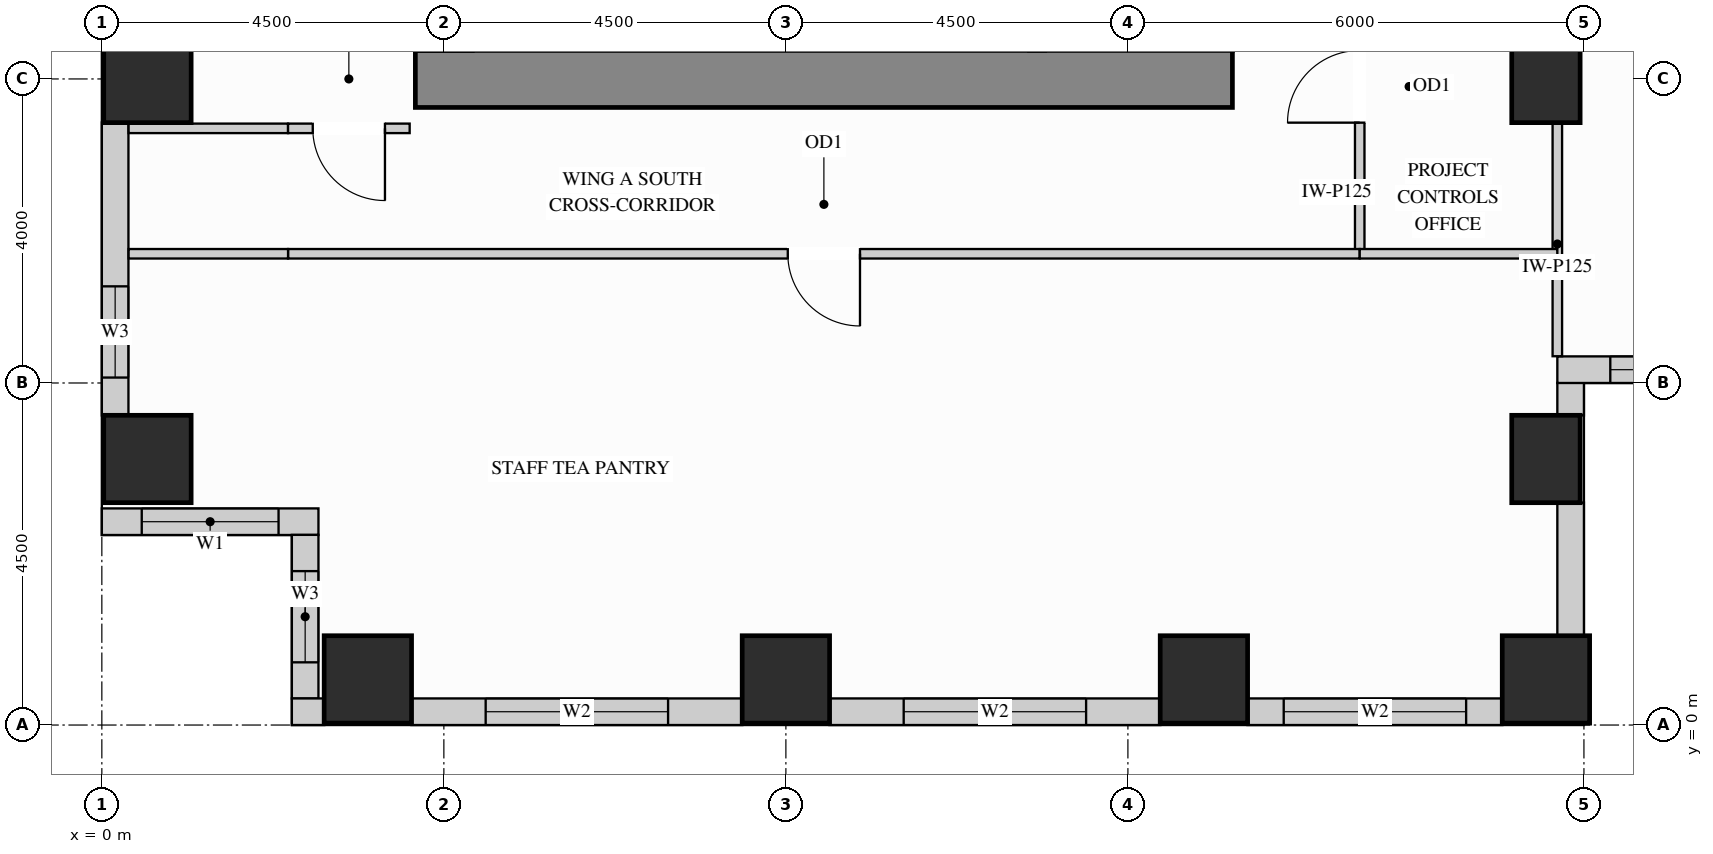
"""IFC4 building model, lengths in metres.
Left out: names, types, materials, properties, quantities, classifications, styles, units other than length and angle.
Written with IfcOpenShell. Run it as: python <this file> out.ifc"""

import sys

from ifc_helpers import new_model, si_unit, direction, frame, frame_2d, origin, origin_2d, place, context, subcontext, project, spatial, rectangle, extrude, source, transform, mapped, element, fill, save


model = new_model("IFC4")
c1 = context("Model", 3, precision=1e-05, world=origin(), true_north=direction((0.0, 1.0)))
c2 = subcontext(c1, "Body", "Model", "MODEL_VIEW")
j1 = project(units=[si_unit("LENGTHUNIT", "METRE"), si_unit("PLANEANGLEUNIT", "RADIAN")], contexts=[c1])
p1 = place(None, origin())
s1 = spatial("IfcSite", under=j1, at=p1, CompositionType="ELEMENT")
p2 = place(p1, origin())
s2 = spatial("IfcBuilding", under=s1, at=p2, CompositionType="ELEMENT")
p3 = place(p2, frame((0.0, 0.0, 84.6)))
s3 = spatial("IfcBuildingStorey", under=s2, at=p3, CompositionType="ELEMENT", Elevation=84.6)
m1 = source(origin(), c2, "Body", "SweptSolid", [
    extrude(rectangle(XDim=0.9, YDim=1.15, at=origin_2d()), origin(), (0.0, 0.0, 1.0), 3.38),
])
for number, where, z_axis, x_axis in (
    (1, (19.0, 3.5, 0.0), (0.0, 0.0, 1.0), (1.0, 0.0, 0.0)),
    (2, (19.0, 8.5, 0.0), (0.0, 0.0, 1.0), (1.0, 0.0, 0.0)),
):
    element("IfcColumn", number, at=place(p3, frame(where, z_axis=z_axis, x_axis=x_axis)), inside=s3, PredefinedType="COLUMN", context=c2, shape_type="MappedRepresentation", body=[
        mapped(m1, transform((0.0, 0.0, 0.0), x_axis=(1.0, 0.0, 0.0), y_axis=(0.0, 1.0, 0.0), z_axis=(0.0, 0.0, 1.0))),
    ])
m2 = source(origin(), c2, "Body", "SweptSolid", [
    extrude(rectangle(XDim=1.15, YDim=1.15, at=origin_2d()), origin(), (0.0, 0.0, 1.0), 3.38),
])
for number, where, z_axis, x_axis in (
    (3, (14.5, 0.6, 0.0), (0.0, 0.0, 1.0), (1.0, 0.0, 0.0)),
    (4, (19.0, 0.6, 0.0), (0.0, 0.0, 1.0), (1.0, 0.0, 0.0)),
    (5, (3.5, 0.6, 0.0), (0.0, 0.0, 1.0), (1.0, 0.0, 0.0)),
    (6, (9.0, 0.6, 0.0), (0.0, 0.0, 1.0), (1.0, 0.0, 0.0)),
    (7, (0.6, 3.5, 0.0), (0.0, 0.0, 1.0), (1.0, 0.0, 0.0)),
    (8, (0.6, 8.5, 0.0), (0.0, 0.0, 1.0), (1.0, 0.0, 0.0)),
):
    element("IfcColumn", number, at=place(p3, frame(where, z_axis=z_axis, x_axis=x_axis)), inside=s3, PredefinedType="COLUMN", context=c2, shape_type="MappedRepresentation", body=[
        mapped(m2, transform((0.0, 0.0, 0.0), x_axis=(1.0, 0.0, 0.0), y_axis=(0.0, 1.0, 0.0), z_axis=(0.0, 0.0, 1.0))),
    ])
m3 = source(origin(), c2, "Body", "SweptSolid", [
    extrude(rectangle(XDim=10.75, YDim=0.75, at=frame_2d((5.375, 0.0))), origin(), (0.0, 0.0, 1.0), 3.38),
])
p4 = place(p3, frame((4.125, 8.5, 0.0), z_axis=(0.0, 0.0, 1.0), x_axis=(1.0, 0.0, 0.0)))
e9 = element("IfcWall", 9, at=p4, inside=s3, PredefinedType="SHEAR", context=c2, shape_type="MappedRepresentation", body=[
    mapped(m3, transform((0.0, 0.0, 0.0), x_axis=(1.0, 0.0, 0.0), y_axis=(0.0, 1.0, 0.0), z_axis=(0.0, 0.0, 1.0))),
])
p5 = place(p3, frame((0.175, 7.927, 0.0), z_axis=(0.0, 0.0, 1.0), x_axis=(0.0, -1.0, 0.0)))
e10 = element("IfcWall", 10, at=p5, inside=s3, PredefinedType="SOLIDWALL", context=c2, shape_type="SweptSolid", body=[
    extrude(rectangle(XDim=3.854, YDim=0.35, at=frame_2d((1.927, 0.0))), origin(), (0.0, 0.0, 1.0), 3.365),
])
p6 = place(p5, frame((2.156, 0.0, 0.78)))
e11 = element("IfcOpeningElement", 11, at=p6, cuts=e10, PredefinedType="OPENING", context=c2, shape_type="SweptSolid", body=[
    extrude(rectangle(XDim=1.2, YDim=2.1, at=frame_2d((0.6, 1.05))), frame((0.0, 0.185, 0.0), z_axis=(0.0, -1.0, 0.0), x_axis=(1.0, 0.0, 0.0)), (0.0, 0.0, 1.0), 0.37),
])
p7 = place(p3, frame((0.0, 2.675, 0.0), z_axis=(0.0, 0.0, 1.0), x_axis=(1.0, 0.0, 0.0)))
e12 = element("IfcWall", 12, at=p7, inside=s3, PredefinedType="SOLIDWALL", context=c2, shape_type="SweptSolid", body=[
    extrude(rectangle(XDim=2.85, YDim=0.35, at=frame_2d((1.425, 0.0))), origin(), (0.0, 0.0, 1.0), 3.365),
])
p8 = place(p7, frame((0.525, 0.0, 0.78)))
e13 = element("IfcOpeningElement", 13, at=p8, cuts=e12, PredefinedType="OPENING", context=c2, shape_type="SweptSolid", body=[
    extrude(rectangle(XDim=1.8, YDim=2.1, at=frame_2d((0.9, 1.05))), frame((0.0, 0.185, 0.0), z_axis=(0.0, -1.0, 0.0), x_axis=(1.0, 0.0, 0.0)), (0.0, 0.0, 1.0), 0.37),
])
p9 = place(p3, frame((2.675, 2.502, 0.0), z_axis=(0.0, 0.0, 1.0), x_axis=(0.0, -1.0, 0.0)))
e14 = element("IfcWall", 14, at=p9, inside=s3, PredefinedType="SOLIDWALL", context=c2, shape_type="SweptSolid", body=[
    extrude(rectangle(XDim=2.154, YDim=0.35, at=frame_2d((1.077, 0.0))), origin(), (0.0, 0.0, 1.0), 3.365),
])
p10 = place(p9, frame((0.477, 0.0, 0.78)))
e15 = element("IfcOpeningElement", 15, at=p10, cuts=e14, PredefinedType="OPENING", context=c2, shape_type="SweptSolid", body=[
    extrude(rectangle(XDim=1.2, YDim=2.1, at=frame_2d((0.6, 1.05))), frame((0.0, 0.185, 0.0), z_axis=(0.0, -1.0, 0.0), x_axis=(1.0, 0.0, 0.0)), (0.0, 0.0, 1.0), 0.37),
])
m4 = source(origin(), c2, "Body", "SweptSolid", [
    extrude(rectangle(XDim=0.427, YDim=0.35, at=frame_2d((0.213, 0.0))), origin(), (0.0, 0.0, 1.0), 3.365),
])
p11 = place(p3, frame((2.5, 0.175, 0.0), z_axis=(0.0, 0.0, 1.0), x_axis=(1.0, 0.0, 0.0)))
e16 = element("IfcWall", 16, at=p11, inside=s3, PredefinedType="SOLIDWALL", context=c2, shape_type="MappedRepresentation", body=[
    mapped(m4, transform((0.0, 0.0, 0.0), x_axis=(1.0, 0.0, 0.0), y_axis=(0.0, 1.0, 0.0), z_axis=(0.0, 0.0, 1.0))),
])
p12 = place(p3, frame((4.073, 0.175, 0.0), z_axis=(0.0, 0.0, 1.0), x_axis=(1.0, 0.0, 0.0)))
e17 = element("IfcWall", 17, at=p12, inside=s3, PredefinedType="SOLIDWALL", context=c2, shape_type="SweptSolid", body=[
    extrude(rectangle(XDim=4.354, YDim=0.35, at=frame_2d((2.177, 0.0))), origin(), (0.0, 0.0, 1.0), 3.365),
])
p13 = place(p12, frame((0.977, 0.0, 0.78)))
e18 = element("IfcOpeningElement", 18, at=p13, cuts=e17, PredefinedType="OPENING", context=c2, shape_type="SweptSolid", body=[
    extrude(rectangle(XDim=2.4, YDim=2.1, at=frame_2d((1.2, 1.05))), frame((0.0, 0.185, 0.0), z_axis=(0.0, -1.0, 0.0), x_axis=(1.0, 0.0, 0.0)), (0.0, 0.0, 1.0), 0.37),
])
p14 = place(p3, frame((9.573, 0.175, 0.0), z_axis=(0.0, 0.0, 1.0), x_axis=(1.0, 0.0, 0.0)))
e19 = element("IfcWall", 19, at=p14, inside=s3, PredefinedType="SOLIDWALL", context=c2, shape_type="SweptSolid", body=[
    extrude(rectangle(XDim=4.354, YDim=0.35, at=frame_2d((2.177, 0.0))), origin(), (0.0, 0.0, 1.0), 3.365),
])
p15 = place(p14, frame((0.977, 0.0, 0.78)))
e20 = element("IfcOpeningElement", 20, at=p15, cuts=e19, PredefinedType="OPENING", context=c2, shape_type="SweptSolid", body=[
    extrude(rectangle(XDim=2.4, YDim=2.1, at=frame_2d((1.2, 1.05))), frame((0.0, 0.185, 0.0), z_axis=(0.0, -1.0, 0.0), x_axis=(1.0, 0.0, 0.0)), (0.0, 0.0, 1.0), 0.37),
])
p16 = place(p3, frame((15.073, 0.175, 0.0), z_axis=(0.0, 0.0, 1.0), x_axis=(1.0, 0.0, 0.0)))
e21 = element("IfcWall", 21, at=p16, inside=s3, PredefinedType="SOLIDWALL", context=c2, shape_type="SweptSolid", body=[
    extrude(rectangle(XDim=3.354, YDim=0.35, at=frame_2d((1.677, 0.0))), origin(), (0.0, 0.0, 1.0), 3.365),
])
p17 = place(p16, frame((0.477, 0.0, 0.78)))
e22 = element("IfcOpeningElement", 22, at=p17, cuts=e21, PredefinedType="OPENING", context=c2, shape_type="SweptSolid", body=[
    extrude(rectangle(XDim=2.4, YDim=2.1, at=frame_2d((1.2, 1.05))), frame((0.0, 0.185, 0.0), z_axis=(0.0, -1.0, 0.0), x_axis=(1.0, 0.0, 0.0)), (0.0, 0.0, 1.0), 0.37),
])
m5 = source(origin(), c2, "Body", "SweptSolid", [
    extrude(rectangle(XDim=1.754, YDim=0.35, at=frame_2d((0.877, 0.0))), origin(), (0.0, 0.0, 1.0), 2.519),
])
p18 = place(p3, frame((19.325, 1.173, 0.0), z_axis=(0.0, 0.0, 1.0), x_axis=(0.0, 1.0, 0.0)))
e23 = element("IfcWall", 23, at=p18, inside=s3, PredefinedType="SOLIDWALL", context=c2, shape_type="MappedRepresentation", body=[
    mapped(m5, transform((0.0, 0.0, 0.0), x_axis=(1.0, 0.0, 0.0), y_axis=(0.0, 1.0, 0.0), z_axis=(0.0, 0.0, 1.0))),
])
m6 = source(origin(), c2, "Body", "SweptSolid", [
    extrude(rectangle(XDim=0.429, YDim=0.35, at=frame_2d((0.214, 0.0))), origin(), (0.0, 0.0, 1.0), 2.677),
])
p19 = place(p3, frame((19.325, 4.073, 0.0), z_axis=(0.0, 0.0, 1.0), x_axis=(0.0, 1.0, 0.0)))
e24 = element("IfcWall", 24, at=p19, inside=s3, PredefinedType="SOLIDWALL", context=c2, shape_type="MappedRepresentation", body=[
    mapped(m6, transform((0.0, 0.0, 0.0), x_axis=(1.0, 0.0, 0.0), y_axis=(0.0, 1.0, 0.0), z_axis=(0.0, 0.0, 1.0))),
])
p20 = place(p3, frame((19.15, 4.675, 0.0), z_axis=(0.0, 0.0, 1.0), x_axis=(1.0, 0.0, 0.0)))
e25 = element("IfcWall", 25, at=p20, inside=s3, PredefinedType="SOLIDWALL", context=c2, shape_type="SweptSolid", body=[
    extrude(rectangle(XDim=15.6, YDim=0.35, at=frame_2d((7.8, 0.0))), origin(), (0.0, 0.0, 1.0), 3.365),
])
p21 = place(p20, frame((0.697, 0.0, 0.78)))
e26 = element("IfcOpeningElement", 26, at=p21, cuts=e25, PredefinedType="OPENING", context=c2, shape_type="SweptSolid", body=[
    extrude(rectangle(XDim=1.5, YDim=2.0, at=frame_2d((0.75, 1.0))), frame((0.0, 0.185, 0.0), z_axis=(0.0, -1.0, 0.0), x_axis=(1.0, 0.0, 0.0)), (0.0, 0.0, 1.0), 0.37),
])
p22 = place(p20, frame((2.573, 0.0, 0.78)))
e27 = element("IfcOpeningElement", 27, at=p22, cuts=e25, PredefinedType="OPENING", context=c2, shape_type="SweptSolid", body=[
    extrude(rectangle(XDim=1.5, YDim=2.0, at=frame_2d((0.75, 1.0))), frame((0.0, 0.185, 0.0), z_axis=(0.0, -1.0, 0.0), x_axis=(1.0, 0.0, 0.0)), (0.0, 0.0, 1.0), 0.37),
])
p23 = place(p20, frame((5.783, 0.0, 0.78)))
e28 = element("IfcOpeningElement", 28, at=p23, cuts=e25, PredefinedType="OPENING", context=c2, shape_type="SweptSolid", body=[
    extrude(rectangle(XDim=1.5, YDim=2.0, at=frame_2d((0.75, 1.0))), frame((0.0, 0.185, 0.0), z_axis=(0.0, -1.0, 0.0), x_axis=(1.0, 0.0, 0.0)), (0.0, 0.0, 1.0), 0.37),
])
p24 = place(p20, frame((8.117, 0.0, 0.78)))
e29 = element("IfcOpeningElement", 29, at=p24, cuts=e25, PredefinedType="OPENING", context=c2, shape_type="SweptSolid", body=[
    extrude(rectangle(XDim=1.5, YDim=2.0, at=frame_2d((0.75, 1.0))), frame((0.0, 0.185, 0.0), z_axis=(0.0, -1.0, 0.0), x_axis=(1.0, 0.0, 0.0)), (0.0, 0.0, 1.0), 0.37),
])
p25 = place(p20, frame((11.393, 0.0, 0.78)))
e30 = element("IfcOpeningElement", 30, at=p25, cuts=e25, PredefinedType="OPENING", context=c2, shape_type="SweptSolid", body=[
    extrude(rectangle(XDim=1.5, YDim=2.0, at=frame_2d((0.75, 1.0))), frame((0.0, 0.185, 0.0), z_axis=(0.0, -1.0, 0.0), x_axis=(1.0, 0.0, 0.0)), (0.0, 0.0, 1.0), 0.37),
])
p26 = place(p20, frame((13.337, 0.0, 0.78)))
e31 = element("IfcOpeningElement", 31, at=p26, cuts=e25, PredefinedType="OPENING", context=c2, shape_type="SweptSolid", body=[
    extrude(rectangle(XDim=1.5, YDim=2.0, at=frame_2d((0.75, 1.0))), frame((0.0, 0.185, 0.0), z_axis=(0.0, -1.0, 0.0), x_axis=(1.0, 0.0, 0.0)), (0.0, 0.0, 1.0), 0.37),
])
m7 = source(origin(), c2, "Body", "SweptSolid", [
    extrude(rectangle(XDim=3.058, YDim=0.125, at=frame_2d((1.529, 0.0))), origin(), (0.0, 0.0, 1.0), 2.677),
])
p27 = place(p3, frame((19.15, 4.852, 0.0), z_axis=(0.0, 0.0, 1.0), x_axis=(0.0, 1.0, 0.0)))
e32 = element("IfcWall", 32, at=p27, inside=s3, PredefinedType="PARTITIONING", context=c2, shape_type="MappedRepresentation", body=[
    mapped(m7, transform((0.0, 0.0, 0.0), x_axis=(1.0, 0.0, 0.0), y_axis=(0.0, 1.0, 0.0), z_axis=(0.0, 0.0, 1.0))),
])
p28 = place(p3, frame((16.55, 6.2, 0.0), z_axis=(0.0, 0.0, 1.0), x_axis=(0.0, 1.0, 0.0)))
e33 = element("IfcWall", 33, at=p28, inside=s3, PredefinedType="PARTITIONING", context=c2, shape_type="SweptSolid", body=[
    extrude(rectangle(XDim=4.4, YDim=0.125, at=frame_2d((2.2, 0.0))), origin(), (0.0, 0.0, 1.0), 3.365),
])
p29 = place(p28, frame((1.725, 0.0, 0.0)))
e34 = element("IfcOpeningElement", 34, at=p29, cuts=e33, PredefinedType="OPENING", context=c2, shape_type="SweptSolid", body=[
    extrude(rectangle(XDim=0.95, YDim=2.15, at=frame_2d((0.475, 1.075))), frame((0.0, 0.073, 0.0), z_axis=(0.0, -1.0, 0.0), x_axis=(1.0, 0.0, 0.0)), (0.0, 0.0, 1.0), 0.145),
])
m8 = source(origin(), c2, "Body", "SweptSolid", [
    extrude(rectangle(XDim=2.098, YDim=0.125, at=frame_2d((1.049, 0.0))), origin(), (0.0, 0.0, 1.0), 3.365),
])
p30 = place(p3, frame((0.352, 7.85, 0.0), z_axis=(0.0, 0.0, 1.0), x_axis=(1.0, 0.0, 0.0)))
e35 = element("IfcWall", 35, at=p30, inside=s3, PredefinedType="PARTITIONING", context=c2, shape_type="MappedRepresentation", body=[
    mapped(m8, transform((0.0, 0.0, 0.0), x_axis=(1.0, 0.0, 0.0), y_axis=(0.0, 1.0, 0.0), z_axis=(0.0, 0.0, 1.0))),
])
p31 = place(p3, frame((2.45, 7.85, 0.0), z_axis=(0.0, 0.0, 1.0), x_axis=(1.0, 0.0, 0.0)))
e36 = element("IfcWall", 36, at=p31, inside=s3, PredefinedType="PARTITIONING", context=c2, shape_type="SweptSolid", body=[
    extrude(rectangle(XDim=1.6, YDim=0.125, at=frame_2d((0.8, 0.0))), origin(), (0.0, 0.0, 1.0), 3.365),
])
p32 = place(p31, frame((0.325, 0.0, 0.0)))
e37 = element("IfcOpeningElement", 37, at=p32, cuts=e36, PredefinedType="OPENING", context=c2, shape_type="SweptSolid", body=[
    extrude(rectangle(XDim=0.95, YDim=2.15, at=frame_2d((0.475, 1.075))), frame((0.0, 0.073, 0.0), z_axis=(0.0, -1.0, 0.0), x_axis=(1.0, 0.0, 0.0)), (0.0, 0.0, 1.0), 0.145),
])
p33 = place(p3, frame((2.45, 6.2, 0.0), z_axis=(0.0, 0.0, 1.0), x_axis=(1.0, 0.0, 0.0)))
e38 = element("IfcWall", 38, at=p33, inside=s3, PredefinedType="PARTITIONING", context=c2, shape_type="SweptSolid", body=[
    extrude(rectangle(XDim=14.1, YDim=0.125, at=frame_2d((7.05, 0.0))), origin(), (0.0, 0.0, 1.0), 2.828),
])
p34 = place(p33, frame((6.575, 0.0, 0.0)))
e39 = element("IfcOpeningElement", 39, at=p34, cuts=e38, PredefinedType="OPENING", context=c2, shape_type="SweptSolid", body=[
    extrude(rectangle(XDim=0.95, YDim=2.15, at=frame_2d((0.475, 1.075))), frame((0.0, 0.073, 0.0), z_axis=(0.0, -1.0, 0.0), x_axis=(1.0, 0.0, 0.0)), (0.0, 0.0, 1.0), 0.145),
])
m9 = source(origin(), c2, "Body", "SweptSolid", [
    extrude(rectangle(XDim=2.098, YDim=0.125, at=frame_2d((1.049, 0.0))), origin(), (0.0, 0.0, 1.0), 2.828),
])
p35 = place(p3, frame((0.352, 6.2, 0.0), z_axis=(0.0, 0.0, 1.0), x_axis=(1.0, 0.0, 0.0)))
e40 = element("IfcWall", 40, at=p35, inside=s3, PredefinedType="PARTITIONING", context=c2, shape_type="MappedRepresentation", body=[
    mapped(m9, transform((0.0, 0.0, 0.0), x_axis=(1.0, 0.0, 0.0), y_axis=(0.0, 1.0, 0.0), z_axis=(0.0, 0.0, 1.0))),
])
m10 = source(origin(), c2, "Body", "SweptSolid", [
    extrude(rectangle(XDim=2.6, YDim=0.125, at=frame_2d((1.3, 0.0))), origin(), (0.0, 0.0, 1.0), 2.828),
])
p36 = place(p3, frame((16.55, 6.2, 0.0), z_axis=(0.0, 0.0, 1.0), x_axis=(1.0, 0.0, 0.0)))
e41 = element("IfcWall", 41, at=p36, inside=s3, PredefinedType="PARTITIONING", context=c2, shape_type="MappedRepresentation", body=[
    mapped(m10, transform((0.0, 0.0, 0.0), x_axis=(1.0, 0.0, 0.0), y_axis=(0.0, 1.0, 0.0), z_axis=(0.0, 0.0, 1.0))),
])
m11 = source(origin(), c2, "Body", "SweptSolid", [
    extrude(rectangle(XDim=0.95, YDim=2.15, at=frame_2d((0.475, 1.075))), frame((0.0, 0.025, 0.0), z_axis=(0.0, -1.0, 0.0), x_axis=(1.0, 0.0, 0.0)), (0.0, 0.0, 1.0), 0.05),
])
p37 = place(p29, origin())
e42 = element("IfcDoor", 42, at=p37, inside=s3, OperationType="SINGLE_SWING_LEFT", PredefinedType="DOOR", context=c2, shape_type="MappedRepresentation", body=[
    mapped(m11, transform((0.0, 0.0, 0.0), x_axis=(1.0, 0.0, 0.0), y_axis=(0.0, 1.0, 0.0), z_axis=(0.0, 0.0, 1.0))),
])
fill(e34, e42)
p38 = place(p34, origin())
e43 = element("IfcDoor", 43, at=p38, inside=s3, OperationType="SINGLE_SWING_RIGHT", PredefinedType="DOOR", context=c2, shape_type="MappedRepresentation", body=[
    mapped(m11, transform((0.0, 0.0, 0.0), x_axis=(1.0, 0.0, 0.0), y_axis=(0.0, 1.0, 0.0), z_axis=(0.0, 0.0, 1.0))),
])
fill(e39, e43)
p39 = place(p32, origin())
e44 = element("IfcDoor", 44, at=p39, inside=s3, OperationType="SINGLE_SWING_RIGHT", PredefinedType="DOOR", context=c2, shape_type="MappedRepresentation", body=[
    mapped(m11, transform((0.0, 0.0, 0.0), x_axis=(1.0, 0.0, 0.0), y_axis=(0.0, 1.0, 0.0), z_axis=(0.0, 0.0, 1.0))),
])
fill(e37, e44)
m12 = source(origin(), c2, "Body", "SweptSolid", [
    extrude(rectangle(XDim=1.8, YDim=2.1, at=frame_2d((0.9, 1.05))), frame((0.0, 0.03, 0.0), z_axis=(0.0, -1.0, 0.0), x_axis=(1.0, 0.0, 0.0)), (0.0, 0.0, 1.0), 0.06),
])
p40 = place(p8, origin())
e45 = element("IfcWindow", 45, at=p40, inside=s3, PartitioningType="SINGLE_PANEL", PredefinedType="WINDOW", context=c2, shape_type="MappedRepresentation", body=[
    mapped(m12, transform((0.0, 0.0, 0.0), x_axis=(1.0, 0.0, 0.0), y_axis=(0.0, 1.0, 0.0), z_axis=(0.0, 0.0, 1.0))),
])
fill(e13, e45)
m13 = source(origin(), c2, "Body", "SweptSolid", [
    extrude(rectangle(XDim=2.4, YDim=2.1, at=frame_2d((1.2, 1.05))), frame((0.0, 0.03, 0.0), z_axis=(0.0, -1.0, 0.0), x_axis=(1.0, 0.0, 0.0)), (0.0, 0.0, 1.0), 0.06),
])
p41 = place(p13, origin())
e46 = element("IfcWindow", 46, at=p41, inside=s3, PartitioningType="SINGLE_PANEL", PredefinedType="WINDOW", context=c2, shape_type="MappedRepresentation", body=[
    mapped(m13, transform((0.0, 0.0, 0.0), x_axis=(1.0, 0.0, 0.0), y_axis=(0.0, 1.0, 0.0), z_axis=(0.0, 0.0, 1.0))),
])
fill(e18, e46)
p42 = place(p15, origin())
e47 = element("IfcWindow", 47, at=p42, inside=s3, PartitioningType="SINGLE_PANEL", PredefinedType="WINDOW", context=c2, shape_type="MappedRepresentation", body=[
    mapped(m13, transform((0.0, 0.0, 0.0), x_axis=(1.0, 0.0, 0.0), y_axis=(0.0, 1.0, 0.0), z_axis=(0.0, 0.0, 1.0))),
])
fill(e20, e47)
p43 = place(p17, origin())
e48 = element("IfcWindow", 48, at=p43, inside=s3, PartitioningType="SINGLE_PANEL", PredefinedType="WINDOW", context=c2, shape_type="MappedRepresentation", body=[
    mapped(m13, transform((0.0, 0.0, 0.0), x_axis=(1.0, 0.0, 0.0), y_axis=(0.0, 1.0, 0.0), z_axis=(0.0, 0.0, 1.0))),
])
fill(e22, e48)
m14 = source(origin(), c2, "Body", "SweptSolid", [
    extrude(rectangle(XDim=1.2, YDim=2.1, at=frame_2d((0.6, 1.05))), frame((0.0, 0.03, 0.0), z_axis=(0.0, -1.0, 0.0), x_axis=(1.0, 0.0, 0.0)), (0.0, 0.0, 1.0), 0.06),
])
p44 = place(p6, origin())
e49 = element("IfcWindow", 49, at=p44, inside=s3, PartitioningType="SINGLE_PANEL", PredefinedType="WINDOW", context=c2, shape_type="MappedRepresentation", body=[
    mapped(m14, transform((0.0, 0.0, 0.0), x_axis=(1.0, 0.0, 0.0), y_axis=(0.0, 1.0, 0.0), z_axis=(0.0, 0.0, 1.0))),
])
fill(e11, e49)
p45 = place(p10, origin())
e50 = element("IfcWindow", 50, at=p45, inside=s3, PartitioningType="SINGLE_PANEL", PredefinedType="WINDOW", context=c2, shape_type="MappedRepresentation", body=[
    mapped(m14, transform((0.0, 0.0, 0.0), x_axis=(1.0, 0.0, 0.0), y_axis=(0.0, 1.0, 0.0), z_axis=(0.0, 0.0, 1.0))),
])
fill(e15, e50)
m15 = source(origin(), c2, "Body", "SweptSolid", [
    extrude(rectangle(XDim=1.5, YDim=2.0, at=frame_2d((0.75, 1.0))), frame((0.0, 0.03, 0.0), z_axis=(0.0, -1.0, 0.0), x_axis=(1.0, 0.0, 0.0)), (0.0, 0.0, 1.0), 0.06),
])
p46 = place(p21, origin())
e51 = element("IfcWindow", 51, at=p46, inside=s3, PartitioningType="SINGLE_PANEL", PredefinedType="WINDOW", context=c2, shape_type="MappedRepresentation", body=[
    mapped(m15, transform((0.0, 0.0, 0.0), x_axis=(1.0, 0.0, 0.0), y_axis=(0.0, 1.0, 0.0), z_axis=(0.0, 0.0, 1.0))),
])
fill(e26, e51)
save(model, sys.argv[1])
